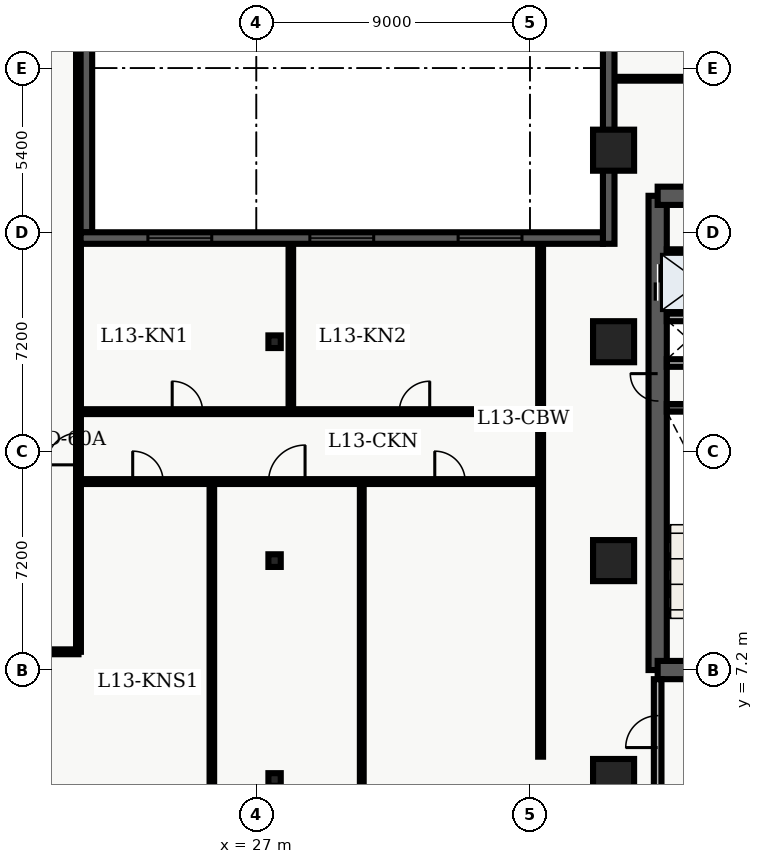
"""IFC4 building model, lengths in metres.
Left out: names, types, materials, properties, quantities, classifications, styles, units other than length and angle.
Written with IfcOpenShell. Run it as: python <this file> out.ifc"""

import sys

from ifc_helpers import new_model, entity, si_unit, converted_unit, direction, frame, origin_with_axes, origin_2d_with_axis, place, context, subcontext, project, spatial, polyline, rectangle, i_section, outline, extrude, element, fill, save


model = new_model("IFC4")
c1 = context("Model", 3, precision=1e-05, world=origin_with_axes(), true_north=direction((0.0, 1.0)))
c2 = subcontext(c1, "Body", "Model", "MODEL_VIEW")
j1 = project(units=[si_unit("LENGTHUNIT", "METRE"), converted_unit("PLANEANGLEUNIT", "DEGREE", entity("IfcPlaneAngleMeasure", 0.017), si_unit("PLANEANGLEUNIT", "RADIAN"), dimensions=[0, 0, 0, 0, 0, 0, 0])], contexts=[c1])
p1 = place(None, origin_with_axes())
s1 = spatial("IfcSite", under=j1, at=p1, CompositionType="ELEMENT")
p2 = place(p1, origin_with_axes())
s2 = spatial("IfcBuilding", under=s1, at=p2, CompositionType="ELEMENT")
p3 = place(p2, frame((0.0, 0.0, 56.1), z_axis=(0.0, 0.0, 1.0), x_axis=(1.0, 0.0, 0.0)))
s3 = spatial("IfcBuildingStorey", under=s2, at=p3, CompositionType="ELEMENT", Elevation=56.1)
p4 = place(p3, frame((40.2, 7.2, 0.0), z_axis=(0.0, 0.0, 1.0), x_axis=(0.0, 1.0, 0.0)))
e1 = element("IfcWall", 1, at=p4, inside=s3, PredefinedType="SHEAR", context=c2, shape_type="SweptSolid", body=[
    extrude(outline(polyline([(0.0, -0.3), (15.6, -0.3), (15.6, 0.3), (0.0, 0.3), (0.0, -0.3)])), origin_with_axes(), (0.0, 0.0, 1.0), 3.66),
])
p5 = place(p4, frame((12.75, 0.0, 0.0), z_axis=(0.0, 0.0, 1.0), x_axis=(1.0, 0.0, 0.0)))
e2 = element("IfcOpeningElement", 2, at=p5, cuts=e1, PredefinedType="OPENING", context=c2, shape_type="SweptSolid", body=[
    extrude(rectangle(XDim=1.2, YDim=0.62, at=origin_2d_with_axis()), origin_with_axes(), (0.0, 0.0, 1.0), 2.15),
])
p6 = place(p4, frame((9.3, 0.0, 0.0), z_axis=(0.0, 0.0, 1.0), x_axis=(1.0, 0.0, 0.0)))
e3 = element("IfcOpeningElement", 3, at=p6, cuts=e1, PredefinedType="OPENING", context=c2, shape_type="SweptSolid", body=[
    extrude(rectangle(XDim=0.9, YDim=0.62, at=origin_2d_with_axis()), origin_with_axes(), (0.0, 0.0, 1.0), 2.15),
])
p7 = place(p3, frame((40.2, 7.2, 0.0), z_axis=(0.0, 0.0, 1.0), x_axis=(1.0, 0.0, 0.0)))
e4 = element("IfcWall", 4, at=p7, inside=s3, PredefinedType="SHEAR", context=c2, shape_type="SweptSolid", body=[
    extrude(outline(polyline([(0.0, -0.3), (7.85, -0.3), (7.85, 0.3), (0.0, 0.3), (0.0, -0.3)])), origin_with_axes(), (0.0, 0.0, 1.0), 3.66),
])
p8 = place(p7, frame((2.175, 0.0, 0.0), z_axis=(0.0, 0.0, 1.0), x_axis=(1.0, 0.0, 0.0)))
e5 = element("IfcOpeningElement", 5, at=p8, cuts=e4, PredefinedType="OPENING", context=c2, shape_type="SweptSolid", body=[
    extrude(rectangle(XDim=1.05, YDim=0.62, at=origin_2d_with_axis()), origin_with_axes(), (0.0, 0.0, 1.0), 2.15),
])
p9 = place(p3, frame((40.2, 22.8, 0.0), z_axis=(0.0, 0.0, 1.0), x_axis=(1.0, 0.0, 0.0)))
e6 = element("IfcWall", 6, at=p9, inside=s3, PredefinedType="SHEAR", context=c2, shape_type="SweptSolid", body=[
    extrude(outline(polyline([(0.0, -0.3), (7.85, -0.3), (7.85, 0.3), (0.0, 0.3), (0.0, -0.3)])), origin_with_axes(), (0.0, 0.0, 1.0), 3.66),
])
p10 = place(p9, frame((5.775, 0.0, 0.0), z_axis=(0.0, 0.0, 1.0), x_axis=(1.0, 0.0, 0.0)))
e7 = element("IfcOpeningElement", 7, at=p10, cuts=e6, PredefinedType="OPENING", context=c2, shape_type="SweptSolid", body=[
    extrude(rectangle(XDim=1.05, YDim=0.62, at=origin_2d_with_axis()), origin_with_axes(), (0.0, 0.0, 1.0), 2.15),
])
p11 = place(p9, frame((2.15, 0.0, 0.0), z_axis=(0.0, 0.0, 1.0), x_axis=(1.0, 0.0, 0.0)))
e8 = element("IfcOpeningElement", 8, at=p11, cuts=e6, PredefinedType="OPENING", context=c2, shape_type="SweptSolid", body=[
    extrude(rectangle(XDim=0.9, YDim=0.62, at=origin_2d_with_axis()), origin_with_axes(), (0.0, 0.0, 1.0), 2.15),
])
p12 = place(p3, frame((40.5, 15.825, 0.0), z_axis=(0.0, 0.0, 1.0), x_axis=(1.0, 0.0, 0.0)))
e9 = element("IfcWall", 9, at=p12, inside=s3, PredefinedType="SHEAR", context=c2, shape_type="SweptSolid", body=[
    extrude(outline(polyline([(0.0, -0.125), (3.5, -0.125), (3.5, 0.125), (0.0, 0.125), (0.0, -0.125)])), origin_with_axes(), (0.0, 0.0, 1.0), 3.66),
])
p13 = place(p3, frame((40.5, 17.3, 0.0), z_axis=(0.0, 0.0, 1.0), x_axis=(1.0, 0.0, 0.0)))
e10 = element("IfcWall", 10, at=p13, inside=s3, PredefinedType="SOLIDWALL", context=c2, shape_type="SweptSolid", body=[
    extrude(outline(polyline([(0.0, -0.125), (3.5, -0.125), (3.5, 0.125), (0.0, 0.125), (0.0, -0.125)])), origin_with_axes(), (0.0, 0.0, 1.0), 2.7),
])
p14 = place(p13, frame((2.4, 0.0, 0.0), z_axis=(0.0, 0.0, 1.0), x_axis=(1.0, 0.0, 0.0)))
e11 = element("IfcOpeningElement", 11, at=p14, cuts=e10, PredefinedType="OPENING", context=c2, shape_type="SweptSolid", body=[
    extrude(rectangle(XDim=0.9, YDim=0.27, at=origin_2d_with_axis()), origin_with_axes(), (0.0, 0.0, 1.0), 2.15),
])
p15 = place(p3, frame((40.5, 18.8, 0.0), z_axis=(0.0, 0.0, 1.0), x_axis=(1.0, 0.0, 0.0)))
e12 = element("IfcWall", 12, at=p15, inside=s3, PredefinedType="SOLIDWALL", context=c2, shape_type="SweptSolid", body=[
    extrude(outline(polyline([(0.0, -0.125), (3.5, -0.125), (3.5, 0.125), (0.0, 0.125), (0.0, -0.125)])), origin_with_axes(), (0.0, 0.0, 1.0), 2.7),
])
p16 = place(p3, frame((40.2, 3.1, 0.0), z_axis=(0.0, 0.0, 1.0), x_axis=(0.0, 1.0, 0.0)))
e13 = element("IfcWall", 13, at=p16, inside=s3, PredefinedType="SOLIDWALL", context=c2, shape_type="SweptSolid", body=[
    extrude(outline(polyline([(0.0, -0.125), (3.8, -0.125), (3.8, 0.125), (0.0, 0.125), (0.0, -0.125)])), origin_with_axes(), (0.0, 0.0, 1.0), 2.7),
])
p17 = place(p16, frame((2.075, 0.0, 0.0), z_axis=(0.0, 0.0, 1.0), x_axis=(1.0, 0.0, 0.0)))
e14 = element("IfcOpeningElement", 14, at=p17, cuts=e13, PredefinedType="OPENING", context=c2, shape_type="SweptSolid", body=[
    extrude(rectangle(XDim=1.05, YDim=0.27, at=origin_2d_with_axis()), origin_with_axes(), (0.0, 0.0, 1.0), 2.15),
])
for number, where, z_axis, x_axis in (
    (15, (27.6, 3.6, 0.0), (0.0, 0.0, 1.0), (1.0, 0.0, 0.0)),
    (16, (27.6, 10.8, 0.0), (0.0, 0.0, 1.0), (1.0, 0.0, 0.0)),
    (17, (27.6, 18.0, 0.0), (0.0, 0.0, 1.0), (1.0, 0.0, 0.0)),
):
    element("IfcColumn", number, at=place(p3, frame(where, z_axis=z_axis, x_axis=x_axis)), inside=s3, PredefinedType="COLUMN", context=c2, shape_type="SweptSolid", body=[
        extrude(i_section(OverallWidth=0.406, OverallDepth=0.416, WebThickness=0.03, FlangeThickness=0.048, FilletRadius=0.022, at=origin_2d_with_axis()), origin_with_axes(), (0.0, 0.0, 1.0), 3.9),
    ])
for number, where, z_axis, x_axis in (
    (18, (38.75, 3.6, 0.0), (0.0, 0.0, 1.0), (1.0, 0.0, 0.0)),
    (19, (38.75, 10.8, 0.0), (0.0, 0.0, 1.0), (1.0, 0.0, 0.0)),
    (20, (38.75, 18.0, 0.0), (0.0, 0.0, 1.0), (1.0, 0.0, 0.0)),
    (21, (38.75, 24.3, 0.0), (0.0, 0.0, 1.0), (1.0, 0.0, 0.0)),
):
    element("IfcColumn", number, at=place(p3, frame(where, z_axis=z_axis, x_axis=x_axis)), inside=s3, PredefinedType="COLUMN", context=c2, shape_type="SweptSolid", body=[
        extrude(rectangle(XDim=1.35, YDim=1.35, at=origin_2d_with_axis()), origin_with_axes(), (0.0, 0.0, 1.0), 3.9),
    ])
p18 = place(p3, frame((40.5, 20.96, 0.0), z_axis=(0.0, 0.0, 1.0), x_axis=(1.0, 0.0, 0.0)))
e22 = element("IfcWall", 22, at=p18, inside=s3, PredefinedType="PARTITIONING", context=c2, shape_type="SweptSolid", body=[
    extrude(outline(polyline([(0.0, -0.08), (3.5, -0.08), (3.5, 0.08), (0.0, 0.08), (0.0, -0.08)])), origin_with_axes(), (0.0, 0.0, 1.0), 2.7),
])
p19 = place(p3, frame((2.6, 7.8, 0.0), z_axis=(0.0, 0.0, 1.0), x_axis=(1.0, 0.0, 0.0)))
e23 = element("IfcWall", 23, at=p19, inside=s3, PredefinedType="PARTITIONING", context=c2, shape_type="SweptSolid", body=[
    extrude(outline(polyline([(0.0, -0.08), (18.55, -0.08), (18.55, 0.08), (0.0, 0.08), (0.0, -0.08)])), origin_with_axes(), (0.0, 0.0, 1.0), 2.7),
])
p20 = place(p19, frame((2.91, 0.0, 0.0), z_axis=(0.0, 0.0, 1.0), x_axis=(1.0, 0.0, 0.0)))
e24 = element("IfcOpeningElement", 24, at=p20, cuts=e23, PredefinedType="OPENING", context=c2, shape_type="SweptSolid", body=[
    extrude(rectangle(XDim=1.2, YDim=0.18, at=origin_2d_with_axis()), origin_with_axes(), (0.0, 0.0, 1.0), 2.2),
])
p21 = place(p19, frame((13.415, 0.0, 0.0), z_axis=(0.0, 0.0, 1.0), x_axis=(1.0, 0.0, 0.0)))
e25 = element("IfcOpeningElement", 25, at=p21, cuts=e23, PredefinedType="OPENING", context=c2, shape_type="SweptSolid", body=[
    extrude(rectangle(XDim=1.0, YDim=0.18, at=origin_2d_with_axis()), origin_with_axes(), (0.0, 0.0, 1.0), 2.15),
])
p22 = place(p3, frame((21.15, 7.8, 0.0), z_axis=(0.0, 0.0, 1.0), x_axis=(0.0, 1.0, 0.0)))
e26 = element("IfcWall", 26, at=p22, inside=s3, PredefinedType="PARTITIONING", context=c2, shape_type="SweptSolid", body=[
    extrude(outline(polyline([(0.0, -0.08), (32.7, -0.08), (32.7, 0.08), (0.0, 0.08), (0.0, -0.08)])), origin_with_axes(), (0.0, 0.0, 1.0), 2.7),
])
p23 = place(p22, frame((6.675, 0.0, 0.0), z_axis=(0.0, 0.0, 1.0), x_axis=(1.0, 0.0, 0.0)))
e27 = element("IfcOpeningElement", 27, at=p23, cuts=e26, PredefinedType="OPENING", context=c2, shape_type="SweptSolid", body=[
    extrude(rectangle(XDim=1.05, YDim=0.18, at=origin_2d_with_axis()), origin_with_axes(), (0.0, 0.0, 1.0), 2.15),
])
p24 = place(p3, frame((21.15, 13.4, 0.0), z_axis=(0.0, 0.0, 1.0), x_axis=(1.0, 0.0, 0.0)))
e28 = element("IfcWall", 28, at=p24, inside=s3, PredefinedType="PARTITIONING", context=c2, shape_type="SweptSolid", body=[
    extrude(outline(polyline([(0.0, -0.08), (15.2, -0.08), (15.2, 0.08), (0.0, 0.08), (0.0, -0.08)])), origin_with_axes(), (0.0, 0.0, 1.0), 2.7),
])
p25 = place(p24, frame((2.284, 0.0, 0.0), z_axis=(0.0, 0.0, 1.0), x_axis=(1.0, 0.0, 0.0)))
e29 = element("IfcOpeningElement", 29, at=p25, cuts=e28, PredefinedType="OPENING", context=c2, shape_type="SweptSolid", body=[
    extrude(rectangle(XDim=1.0, YDim=0.18, at=origin_2d_with_axis()), origin_with_axes(), (0.0, 0.0, 1.0), 2.15),
])
p26 = place(p24, frame((6.853, 0.0, 0.0), z_axis=(0.0, 0.0, 1.0), x_axis=(1.0, 0.0, 0.0)))
e30 = element("IfcOpeningElement", 30, at=p26, cuts=e28, PredefinedType="OPENING", context=c2, shape_type="SweptSolid", body=[
    extrude(rectangle(XDim=1.2, YDim=0.18, at=origin_2d_with_axis()), origin_with_axes(), (0.0, 0.0, 1.0), 2.2),
])
p27 = place(p24, frame((12.219, 0.0, 0.0), z_axis=(0.0, 0.0, 1.0), x_axis=(1.0, 0.0, 0.0)))
e31 = element("IfcOpeningElement", 31, at=p27, cuts=e28, PredefinedType="OPENING", context=c2, shape_type="SweptSolid", body=[
    extrude(rectangle(XDim=1.0, YDim=0.18, at=origin_2d_with_axis()), origin_with_axes(), (0.0, 0.0, 1.0), 2.15),
])
p28 = place(p3, frame((21.15, 15.7, 0.0), z_axis=(0.0, 0.0, 1.0), x_axis=(1.0, 0.0, 0.0)))
e32 = element("IfcWall", 32, at=p28, inside=s3, PredefinedType="PARTITIONING", context=c2, shape_type="SweptSolid", body=[
    extrude(outline(polyline([(0.0, -0.08), (15.2, -0.08), (15.2, 0.08), (0.0, 0.08), (0.0, -0.08)])), origin_with_axes(), (0.0, 0.0, 1.0), 2.7),
])
p29 = place(p28, frame((3.583, 0.0, 0.0), z_axis=(0.0, 0.0, 1.0), x_axis=(1.0, 0.0, 0.0)))
e33 = element("IfcOpeningElement", 33, at=p29, cuts=e32, PredefinedType="OPENING", context=c2, shape_type="SweptSolid", body=[
    extrude(rectangle(XDim=1.0, YDim=0.18, at=origin_2d_with_axis()), origin_with_axes(), (0.0, 0.0, 1.0), 2.15),
])
p30 = place(p28, frame((11.053, 0.0, 0.0), z_axis=(0.0, 0.0, 1.0), x_axis=(1.0, 0.0, 0.0)))
e34 = element("IfcOpeningElement", 34, at=p30, cuts=e32, PredefinedType="OPENING", context=c2, shape_type="SweptSolid", body=[
    extrude(rectangle(XDim=1.0, YDim=0.18, at=origin_2d_with_axis()), origin_with_axes(), (0.0, 0.0, 1.0), 2.15),
])
p31 = place(p3, frame((36.35, 4.35, 0.0), z_axis=(0.0, 0.0, 1.0), x_axis=(0.0, 1.0, 0.0)))
e35 = element("IfcWall", 35, at=p31, inside=s3, PredefinedType="PARTITIONING", context=c2, shape_type="SweptSolid", body=[
    extrude(outline(polyline([(0.0, -0.08), (16.95, -0.08), (16.95, 0.08), (0.0, 0.08), (0.0, -0.08)])), origin_with_axes(), (0.0, 0.0, 1.0), 2.7),
])
p32 = place(p3, frame((25.537, 0.36, 0.0), z_axis=(0.0, 0.0, 1.0), x_axis=(0.0, 1.0, 0.0)))
e36 = element("IfcWall", 36, at=p32, inside=s3, PredefinedType="PARTITIONING", context=c2, shape_type="SweptSolid", body=[
    extrude(outline(polyline([(0.0, -0.075), (12.92, -0.075), (12.92, 0.075), (0.0, 0.075), (0.0, -0.075)])), origin_with_axes(), (0.0, 0.0, 1.0), 2.7),
])
p33 = place(p3, frame((30.468, 0.36, 0.0), z_axis=(0.0, 0.0, 1.0), x_axis=(0.0, 1.0, 0.0)))
e37 = element("IfcWall", 37, at=p33, inside=s3, PredefinedType="PARTITIONING", context=c2, shape_type="SweptSolid", body=[
    extrude(outline(polyline([(0.0, -0.062), (12.92, -0.062), (12.92, 0.062), (0.0, 0.062), (0.0, -0.062)])), origin_with_axes(), (0.0, 0.0, 1.0), 2.7),
])
p34 = place(p3, frame((28.135, 15.82, 0.0), z_axis=(0.0, 0.0, 1.0), x_axis=(0.0, 1.0, 0.0)))
e38 = element("IfcWall", 38, at=p34, inside=s3, PredefinedType="PARTITIONING", context=c2, shape_type="SweptSolid", body=[
    extrude(outline(polyline([(0.0, -0.075), (5.405, -0.075), (5.405, 0.075), (0.0, 0.075), (0.0, -0.075)])), origin_with_axes(), (0.0, 0.0, 1.0), 2.7),
])
p35 = place(p3, frame((38.76, 26.65, 0.0), z_axis=(0.0, 0.0, 1.0), x_axis=(1.0, 0.0, 0.0)))
e39 = element("IfcWall", 39, at=p35, inside=s3, PredefinedType="PARTITIONING", context=c2, shape_type="SweptSolid", body=[
    extrude(outline(polyline([(0.0, -0.062), (20.88, -0.062), (20.88, 0.062), (0.0, 0.062), (0.0, -0.062)])), origin_with_axes(), (0.0, 0.0, 1.0), 2.7),
])
p36 = place(p35, frame((4.24, 0.0, 0.0), z_axis=(0.0, 0.0, 1.0), x_axis=(1.0, 0.0, 0.0)))
e40 = element("IfcOpeningElement", 40, at=p36, cuts=e39, PredefinedType="OPENING", context=c2, shape_type="SweptSolid", body=[
    extrude(rectangle(XDim=1.0, YDim=0.145, at=origin_2d_with_axis()), origin_with_axes(), (0.0, 0.0, 1.0), 2.15),
])
p37 = place(p3, frame((38.59, 21.22, 0.0), z_axis=(0.0, 0.0, 1.0), x_axis=(0.0, 1.0, 0.0)))
e41 = element("IfcWall", 41, at=p37, inside=s3, PredefinedType="SOLIDWALL", context=c2, shape_type="SweptSolid", body=[
    extrude(outline(polyline([(0.0, -0.19), (7.58, -0.19), (7.58, 0.19), (0.0, 0.19), (0.0, -0.19)])), origin_with_axes(), (0.0, 0.0, 1.0), 3.66),
])
p38 = place(p3, frame((21.41, 45.82, 0.0), z_axis=(0.0, 0.0, 1.0), x_axis=(0.0, -1.0, 0.0)))
e42 = element("IfcWall", 42, at=p38, inside=s3, PredefinedType="SOLIDWALL", context=c2, shape_type="SweptSolid", body=[
    extrude(outline(polyline([(0.0, -0.19), (24.22, -0.19), (24.22, 0.19), (0.0, 0.19), (0.0, -0.19)])), origin_with_axes(), (0.0, 0.0, 1.0), 3.66),
])
p39 = place(p38, frame((2.902, 0.0, 0.45), z_axis=(0.0, 0.0, 1.0), x_axis=(1.0, 0.0, 0.0)))
e43 = element("IfcOpeningElement", 43, at=p39, cuts=e42, PredefinedType="OPENING", context=c2, shape_type="SweptSolid", body=[
    extrude(rectangle(XDim=2.1, YDim=0.4, at=origin_2d_with_axis()), origin_with_axes(), (0.0, 0.0, 1.0), 2.2),
])
p40 = place(p3, frame((21.22, 21.41, 0.0), z_axis=(0.0, 0.0, 1.0), x_axis=(1.0, 0.0, 0.0)))
e44 = element("IfcWall", 44, at=p40, inside=s3, PredefinedType="SOLIDWALL", context=c2, shape_type="SweptSolid", body=[
    extrude(outline(polyline([(0.0, -0.19), (17.18, -0.19), (17.18, 0.19), (0.0, 0.19), (0.0, -0.19)])), origin_with_axes(), (0.0, 0.0, 1.0), 3.66),
])
p41 = place(p40, frame((3.263, 0.0, 0.45), z_axis=(0.0, 0.0, 1.0), x_axis=(1.0, 0.0, 0.0)))
e45 = element("IfcOpeningElement", 45, at=p41, cuts=e44, PredefinedType="OPENING", context=c2, shape_type="SweptSolid", body=[
    extrude(rectangle(XDim=2.1, YDim=0.4, at=origin_2d_with_axis()), origin_with_axes(), (0.0, 0.0, 1.0), 2.2),
])
p42 = place(p40, frame((8.59, 0.0, 0.45), z_axis=(0.0, 0.0, 1.0), x_axis=(1.0, 0.0, 0.0)))
e46 = element("IfcOpeningElement", 46, at=p42, cuts=e44, PredefinedType="OPENING", context=c2, shape_type="SweptSolid", body=[
    extrude(rectangle(XDim=2.1, YDim=0.4, at=origin_2d_with_axis()), origin_with_axes(), (0.0, 0.0, 1.0), 2.2),
])
p43 = place(p40, frame((13.467, 0.0, 0.45), z_axis=(0.0, 0.0, 1.0), x_axis=(1.0, 0.0, 0.0)))
e47 = element("IfcOpeningElement", 47, at=p43, cuts=e44, PredefinedType="OPENING", context=c2, shape_type="SweptSolid", body=[
    extrude(rectangle(XDim=2.1, YDim=0.4, at=origin_2d_with_axis()), origin_with_axes(), (0.0, 0.0, 1.0), 2.2),
])
p44 = place(p4, frame((12.75, 0.0, 0.0), z_axis=(0.0, 0.0, 1.0), x_axis=(1.0, 0.0, 0.0)))
e48 = element("IfcDoor", 48, at=p44, inside=s3, OperationType="DOUBLE_DOOR_SLIDING", PredefinedType="DOOR", context=c2, shape_type="SweptSolid", body=[
    extrude(rectangle(XDim=1.2, YDim=0.09, at=origin_2d_with_axis()), origin_with_axes(), (0.0, 0.0, 1.0), 2.15),
])
fill(e2, e48)
p45 = place(p4, frame((9.3, 0.0, 0.0), z_axis=(0.0, 0.0, 1.0), x_axis=(1.0, 0.0, 0.0)))
e49 = element("IfcDoor", 49, at=p45, inside=s3, OperationType="SINGLE_SWING_RIGHT", PredefinedType="DOOR", context=c2, shape_type="SweptSolid", body=[
    extrude(rectangle(XDim=0.9, YDim=0.09, at=origin_2d_with_axis()), origin_with_axes(), (0.0, 0.0, 1.0), 2.15),
])
fill(e3, e49)
p46 = place(p16, frame((2.075, 0.0, 0.0), z_axis=(0.0, 0.0, 1.0), x_axis=(1.0, 0.0, 0.0)))
e50 = element("IfcDoor", 50, at=p46, inside=s3, OperationType="SINGLE_SWING_LEFT", PredefinedType="DOOR", context=c2, shape_type="SweptSolid", body=[
    extrude(rectangle(XDim=1.05, YDim=0.09, at=origin_2d_with_axis()), origin_with_axes(), (0.0, 0.0, 1.0), 2.15),
])
fill(e14, e50)
p47 = place(p22, frame((6.675, 0.0, 0.0), z_axis=(0.0, 0.0, 1.0), x_axis=(1.0, 0.0, 0.0)))
e51 = element("IfcDoor", 51, at=p47, inside=s3, OperationType="SINGLE_SWING_LEFT", PredefinedType="DOOR", context=c2, shape_type="SweptSolid", body=[
    extrude(rectangle(XDim=1.05, YDim=0.09, at=origin_2d_with_axis()), origin_with_axes(), (0.0, 0.0, 1.0), 2.15),
])
fill(e27, e51)
p48 = place(p24, frame((2.284, 0.0, 0.0), z_axis=(0.0, 0.0, 1.0), x_axis=(1.0, 0.0, 0.0)))
e52 = element("IfcDoor", 52, at=p48, inside=s3, OperationType="SINGLE_SWING_LEFT", PredefinedType="DOOR", context=c2, shape_type="SweptSolid", body=[
    extrude(rectangle(XDim=1.0, YDim=0.09, at=origin_2d_with_axis()), origin_with_axes(), (0.0, 0.0, 1.0), 2.15),
])
fill(e29, e52)
p49 = place(p24, frame((6.853, 0.0, 0.0), z_axis=(0.0, 0.0, 1.0), x_axis=(1.0, 0.0, 0.0)))
e53 = element("IfcDoor", 53, at=p49, inside=s3, OperationType="SINGLE_SWING_RIGHT", PredefinedType="DOOR", context=c2, shape_type="SweptSolid", body=[
    extrude(rectangle(XDim=1.2, YDim=0.09, at=origin_2d_with_axis()), origin_with_axes(), (0.0, 0.0, 1.0), 2.2),
])
fill(e30, e53)
p50 = place(p24, frame((12.219, 0.0, 0.0), z_axis=(0.0, 0.0, 1.0), x_axis=(1.0, 0.0, 0.0)))
e54 = element("IfcDoor", 54, at=p50, inside=s3, OperationType="SINGLE_SWING_LEFT", PredefinedType="DOOR", context=c2, shape_type="SweptSolid", body=[
    extrude(rectangle(XDim=1.0, YDim=0.09, at=origin_2d_with_axis()), origin_with_axes(), (0.0, 0.0, 1.0), 2.15),
])
fill(e31, e54)
p51 = place(p28, frame((3.583, 0.0, 0.0), z_axis=(0.0, 0.0, 1.0), x_axis=(1.0, 0.0, 0.0)))
e55 = element("IfcDoor", 55, at=p51, inside=s3, OperationType="SINGLE_SWING_LEFT", PredefinedType="DOOR", context=c2, shape_type="SweptSolid", body=[
    extrude(rectangle(XDim=1.0, YDim=0.09, at=origin_2d_with_axis()), origin_with_axes(), (0.0, 0.0, 1.0), 2.15),
])
fill(e33, e55)
p52 = place(p28, frame((11.053, 0.0, 0.0), z_axis=(0.0, 0.0, 1.0), x_axis=(1.0, 0.0, 0.0)))
e56 = element("IfcDoor", 56, at=p52, inside=s3, OperationType="SINGLE_SWING_RIGHT", PredefinedType="DOOR", context=c2, shape_type="SweptSolid", body=[
    extrude(rectangle(XDim=1.0, YDim=0.09, at=origin_2d_with_axis()), origin_with_axes(), (0.0, 0.0, 1.0), 2.15),
])
fill(e34, e56)
p53 = place(p40, frame((3.263, 0.0, 0.45), z_axis=(0.0, 0.0, 1.0), x_axis=(1.0, 0.0, 0.0)))
e57 = element("IfcWindow", 57, at=p53, inside=s3, PredefinedType="WINDOW", context=c2, shape_type="SweptSolid", body=[
    extrude(rectangle(XDim=2.1, YDim=0.09, at=origin_2d_with_axis()), origin_with_axes(), (0.0, 0.0, 1.0), 2.2),
])
fill(e45, e57)
p54 = place(p40, frame((8.59, 0.0, 0.45), z_axis=(0.0, 0.0, 1.0), x_axis=(1.0, 0.0, 0.0)))
e58 = element("IfcWindow", 58, at=p54, inside=s3, PredefinedType="WINDOW", context=c2, shape_type="SweptSolid", body=[
    extrude(rectangle(XDim=2.1, YDim=0.09, at=origin_2d_with_axis()), origin_with_axes(), (0.0, 0.0, 1.0), 2.2),
])
fill(e46, e58)
p55 = place(p40, frame((13.467, 0.0, 0.45), z_axis=(0.0, 0.0, 1.0), x_axis=(1.0, 0.0, 0.0)))
e59 = element("IfcWindow", 59, at=p55, inside=s3, PredefinedType="WINDOW", context=c2, shape_type="SweptSolid", body=[
    extrude(rectangle(XDim=2.1, YDim=0.09, at=origin_2d_with_axis()), origin_with_axes(), (0.0, 0.0, 1.0), 2.2),
])
fill(e47, e59)
save(model, sys.argv[1])
